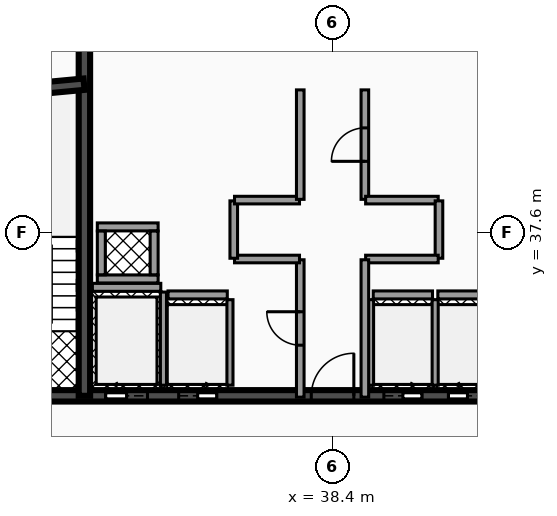
"""IFC4 building model, lengths in metres.
Left out: names, types, materials, properties, quantities, classifications, styles, units other than length and angle.
Written with IfcOpenShell. Run it as: python <this file> out.ifc"""

import sys

from ifc_helpers import new_model, si_unit, direction, frame, frame_2d, origin, place, context, subcontext, project, spatial, rectangle, extrude, element, fill, save


model = new_model("IFC4")
c1 = context("Model", 3, precision=1e-05, world=origin(), true_north=direction((0.0, 1.0)))
c2 = subcontext(c1, "Body", "Model", "MODEL_VIEW")
j1 = project(units=[si_unit("LENGTHUNIT", "METRE"), si_unit("PLANEANGLEUNIT", "RADIAN")], contexts=[c1])
p1 = place(None, origin())
s1 = spatial("IfcSite", under=j1, at=p1, CompositionType="ELEMENT")
p2 = place(p1, origin())
s2 = spatial("IfcBuilding", under=s1, at=p2, CompositionType="ELEMENT")
p3 = place(p2, frame((0.0, 0.0, 218.96)))
s3 = spatial("IfcBuildingStorey", under=s2, at=p3, CompositionType="ELEMENT", Elevation=218.96)
p4 = place(p3, frame((28.5, 33.3, 0.0), z_axis=(0.0, 0.0, 1.0), x_axis=(1.0, 0.0, 0.0)))
e1 = element("IfcWall", 1, at=p4, inside=s3, PredefinedType="SHEAR", context=c2, shape_type="SweptSolid", body=[
    extrude(rectangle(XDim=19.86, YDim=0.3, at=frame_2d((9.93, 0.0))), origin(), (0.0, 0.0, 1.0), 3.18),
])
p5 = place(p4, frame((3.93, 0.0, 0.0)))
e2 = element("IfcOpeningElement", 2, at=p5, cuts=e1, PredefinedType="OPENING", context=c2, shape_type="SweptSolid", body=[
    extrude(rectangle(XDim=1.1, YDim=2.15, at=frame_2d((0.55, 1.075))), frame((0.0, 0.16, 0.0), z_axis=(0.0, -1.0, 0.0), x_axis=(1.0, 0.0, 0.0)), (0.0, 0.0, 1.0), 0.32),
])
p6 = place(p4, frame((14.77, 0.0, 0.0)))
e3 = element("IfcOpeningElement", 3, at=p6, cuts=e1, PredefinedType="OPENING", context=c2, shape_type="SweptSolid", body=[
    extrude(rectangle(XDim=1.1, YDim=2.15, at=frame_2d((0.55, 1.075))), frame((0.0, 0.16, 0.0), z_axis=(0.0, -1.0, 0.0), x_axis=(1.0, 0.0, 0.0)), (0.0, 0.0, 1.0), 0.32),
])
p7 = place(p4, frame((11.25, 0.0, 0.0)))
e4 = element("IfcOpeningElement", 4, at=p7, cuts=e1, PredefinedType="OPENING", context=c2, shape_type="SweptSolid", body=[
    extrude(rectangle(XDim=1.0, YDim=2.1, at=frame_2d((0.5, 1.05))), frame((0.0, 0.16, 0.0), z_axis=(0.0, -1.0, 0.0), x_axis=(1.0, 0.0, 0.0)), (0.0, 0.0, 1.0), 0.32),
])
p8 = place(p4, frame((12.95, 0.0, 0.0)))
e5 = element("IfcOpeningElement", 5, at=p8, cuts=e1, PredefinedType="OPENING", context=c2, shape_type="SweptSolid", body=[
    extrude(rectangle(XDim=1.0, YDim=2.1, at=frame_2d((0.5, 1.05))), frame((0.0, 0.16, 0.0), z_axis=(0.0, -1.0, 0.0), x_axis=(1.0, 0.0, 0.0)), (0.0, 0.0, 1.0), 0.32),
])
p9 = place(p4, frame((5.85, 0.0, 0.0)))
e6 = element("IfcOpeningElement", 6, at=p9, cuts=e1, PredefinedType="OPENING", context=c2, shape_type="SweptSolid", body=[
    extrude(rectangle(XDim=1.0, YDim=2.1, at=frame_2d((0.5, 1.05))), frame((0.0, 0.16, 0.0), z_axis=(0.0, -1.0, 0.0), x_axis=(1.0, 0.0, 0.0)), (0.0, 0.0, 1.0), 0.32),
])
p10 = place(p4, frame((1.21, 0.0, 0.0)))
e7 = element("IfcOpeningElement", 7, at=p10, cuts=e1, PredefinedType="OPENING", context=c2, shape_type="SweptSolid", body=[
    extrude(rectangle(XDim=1.1, YDim=2.2, at=frame_2d((0.55, 1.1))), frame((0.0, 0.16, 0.0), z_axis=(0.0, -1.0, 0.0), x_axis=(1.0, 0.0, 0.0)), (0.0, 0.0, 1.0), 0.32),
])
p11 = place(p4, frame((9.34, 0.0, 0.0)))
e8 = element("IfcOpeningElement", 8, at=p11, cuts=e1, PredefinedType="OPENING", context=c2, shape_type="SweptSolid", body=[
    extrude(rectangle(XDim=1.12, YDim=2.05, at=frame_2d((0.56, 1.025))), frame((0.0, 0.16, 0.0), z_axis=(0.0, -1.0, 0.0), x_axis=(1.0, 0.0, 0.0)), (0.0, 0.0, 1.0), 0.32),
])
p12 = place(p4, frame((17.55, 0.0, 0.0)))
e9 = element("IfcOpeningElement", 9, at=p12, cuts=e1, PredefinedType="OPENING", context=c2, shape_type="SweptSolid", body=[
    extrude(rectangle(XDim=1.1, YDim=2.2, at=frame_2d((0.55, 1.1))), frame((0.0, 0.16, 0.0), z_axis=(0.0, -1.0, 0.0), x_axis=(1.0, 0.0, 0.0)), (0.0, 0.0, 1.0), 0.32),
])
p13 = place(p3, frame((31.87, 33.3, 0.0), z_axis=(0.0, 0.0, 1.0), x_axis=(0.0, 1.0, 0.0)))
e10 = element("IfcWall", 10, at=p13, inside=s3, PredefinedType="SHEAR", context=c2, shape_type="SweptSolid", body=[
    extrude(rectangle(XDim=10.1, YDim=0.3, at=frame_2d((5.05, 0.0))), origin(), (0.0, 0.0, 1.0), 3.18),
])
p14 = place(p3, frame((28.64, 41.2, 0.0), z_axis=(0.0, 0.0, 1.0), x_axis=(0.995687118776, 0.092774789157, 0.0)))
e11 = element("IfcWall", 11, at=p14, inside=s3, PredefinedType="SHEAR", context=c2, shape_type="SweptSolid", body=[
    extrude(rectangle(XDim=3.234, YDim=0.3, at=frame_2d((1.617, 0.0))), origin(), (0.0, 0.0, 1.0), 3.18),
])
p15 = place(p3, frame((32.08, 36.155, 0.0), z_axis=(0.0, 0.0, 1.0), x_axis=(1.0, 0.0, 0.0)))
e12 = element("IfcWall", 12, at=p15, inside=s3, PredefinedType="SOLIDWALL", context=c2, shape_type="SweptSolid", body=[
    extrude(rectangle(XDim=1.8, YDim=0.21, at=frame_2d((0.9, 0.0))), origin(), (0.0, 0.0, 1.0), 3.18),
])
p16 = place(p3, frame((33.95, 33.58, 0.0), z_axis=(0.0, 0.0, 1.0), x_axis=(0.0, 1.0, 0.0)))
e13 = element("IfcWall", 13, at=p16, inside=s3, PredefinedType="SOLIDWALL", context=c2, shape_type="SweptSolid", body=[
    extrude(rectangle(XDim=2.45, YDim=0.16, at=frame_2d((1.225, 0.0))), origin(), (0.0, 0.0, 1.0), 3.18),
])
p17 = place(p3, frame((39.47, 35.955, 0.0), z_axis=(0.0, 0.0, 1.0), x_axis=(1.0, 0.0, 0.0)))
e14 = element("IfcWall", 14, at=p17, inside=s3, PredefinedType="SOLIDWALL", context=c2, shape_type="SweptSolid", body=[
    extrude(rectangle(XDim=1.56, YDim=0.21, at=frame_2d((0.78, 0.0))), origin(), (0.0, 0.0, 1.0), 3.18),
])
for number, where, z_axis, x_axis in (
    (15, (39.4, 33.58, 0.0), (0.0, 0.0, 1.0), (0.0, 1.0, 0.0)),
    (16, (41.1, 33.58, 0.0), (0.0, 0.0, 1.0), (0.0, 1.0, 0.0)),
):
    element("IfcWall", number, at=place(p3, frame(where, z_axis=z_axis, x_axis=x_axis)), inside=s3, PredefinedType="SOLIDWALL", context=c2, shape_type="SweptSolid", body=[
        extrude(rectangle(XDim=2.25, YDim=0.16, at=frame_2d((1.125, 0.0))), origin(), (0.0, 0.0, 1.0), 3.18),
    ])
p18 = place(p3, frame((41.17, 35.955, 0.0), z_axis=(0.0, 0.0, 1.0), x_axis=(1.0, 0.0, 0.0)))
e17 = element("IfcWall", 17, at=p18, inside=s3, PredefinedType="SOLIDWALL", context=c2, shape_type="SweptSolid", body=[
    extrude(rectangle(XDim=1.56, YDim=0.21, at=frame_2d((0.78, 0.0))), origin(), (0.0, 0.0, 1.0), 3.18),
])
p19 = place(p3, frame((34.07, 35.955, 0.0), z_axis=(0.0, 0.0, 1.0), x_axis=(1.0, 0.0, 0.0)))
e18 = element("IfcWall", 18, at=p19, inside=s3, PredefinedType="SOLIDWALL", context=c2, shape_type="SweptSolid", body=[
    extrude(rectangle(XDim=1.56, YDim=0.21, at=frame_2d((0.78, 0.0))), origin(), (0.0, 0.0, 1.0), 3.18),
])
p20 = place(p3, frame((35.7, 33.58, 0.0), z_axis=(0.0, 0.0, 1.0), x_axis=(0.0, 1.0, 0.0)))
e19 = element("IfcWall", 19, at=p20, inside=s3, PredefinedType="SOLIDWALL", context=c2, shape_type="SweptSolid", body=[
    extrude(rectangle(XDim=2.25, YDim=0.16, at=frame_2d((1.125, 0.0))), origin(), (0.0, 0.0, 1.0), 3.18),
])
for number, where, z_axis, x_axis in (
    (20, (32.21, 36.375, 0.0), (0.0, 0.0, 1.0), (1.0, 0.0, 0.0)),
    (21, (32.21, 37.745, 0.0), (0.0, 0.0, 1.0), (1.0, 0.0, 0.0)),
):
    element("IfcWall", number, at=place(p3, frame(where, z_axis=z_axis, x_axis=x_axis)), inside=s3, PredefinedType="SOLIDWALL", context=c2, shape_type="SweptSolid", body=[
        extrude(rectangle(XDim=1.6, YDim=0.21, at=frame_2d((0.8, 0.0))), origin(), (0.0, 0.0, 1.0), 3.18),
    ])
for number, where, z_axis, x_axis in (
    (22, (32.315, 36.485, 0.0), (0.0, 0.0, 1.0), (0.0, 1.0, 0.0)),
    (23, (33.705, 36.485, 0.0), (0.0, 0.0, 1.0), (0.0, 1.0, 0.0)),
):
    element("IfcWall", number, at=place(p3, frame(where, z_axis=z_axis, x_axis=x_axis)), inside=s3, PredefinedType="SOLIDWALL", context=c2, shape_type="SweptSolid", body=[
        extrude(rectangle(XDim=1.15, YDim=0.21, at=frame_2d((0.575, 0.0))), origin(), (0.0, 0.0, 1.0), 3.18),
    ])
p21 = place(p3, frame((37.55, 33.265, 0.0), z_axis=(0.0, 0.0, 1.0), x_axis=(0.0, 1.0, 0.0)))
e24 = element("IfcWall", 24, at=p21, inside=s3, PredefinedType="PARTITIONING", context=c2, shape_type="SweptSolid", body=[
    extrude(rectangle(XDim=3.615, YDim=0.2, at=frame_2d((1.808, 0.0))), origin(), (0.0, 0.0, 1.0), 2.235),
])
p22 = place(p21, frame((1.367, 0.0, 0.0)))
e25 = element("IfcOpeningElement", 25, at=p22, cuts=e24, PredefinedType="OPENING", context=c2, shape_type="SweptSolid", body=[
    extrude(rectangle(XDim=0.88, YDim=2.05, at=frame_2d((0.44, 1.025))), frame((0.0, 0.11, 0.0), z_axis=(0.0, -1.0, 0.0), x_axis=(1.0, 0.0, 0.0)), (0.0, 0.0, 1.0), 0.22),
])
p23 = place(p3, frame((35.82, 36.9, 0.0), z_axis=(0.0, 0.0, 1.0), x_axis=(1.0, 0.0, 0.0)))
e26 = element("IfcWall", 26, at=p23, inside=s3, PredefinedType="PARTITIONING", context=c2, shape_type="SweptSolid", body=[
    extrude(rectangle(XDim=1.71, YDim=0.2, at=frame_2d((0.855, 0.0))), origin(), (0.0, 0.0, 1.0), 2.235),
])
p24 = place(p3, frame((35.8, 36.92, 0.0), z_axis=(0.0, 0.0, 1.0), x_axis=(0.0, 1.0, 0.0)))
e27 = element("IfcWall", 27, at=p24, inside=s3, PredefinedType="PARTITIONING", context=c2, shape_type="SweptSolid", body=[
    extrude(rectangle(XDim=1.51, YDim=0.2, at=frame_2d((0.755, 0.0))), origin(), (0.0, 0.0, 1.0), 2.235),
])
p25 = place(p3, frame((35.82, 38.45, 0.0), z_axis=(0.0, 0.0, 1.0), x_axis=(1.0, 0.0, 0.0)))
e28 = element("IfcWall", 28, at=p25, inside=s3, PredefinedType="PARTITIONING", context=c2, shape_type="SweptSolid", body=[
    extrude(rectangle(XDim=1.71, YDim=0.2, at=frame_2d((0.855, 0.0))), origin(), (0.0, 0.0, 1.0), 2.235),
])
p26 = place(p3, frame((37.55, 38.47, 0.0), z_axis=(0.0, 0.0, 1.0), x_axis=(0.0, 1.0, 0.0)))
e29 = element("IfcWall", 29, at=p26, inside=s3, PredefinedType="PARTITIONING", context=c2, shape_type="SweptSolid", body=[
    extrude(rectangle(XDim=2.88, YDim=0.2, at=frame_2d((1.44, 0.0))), origin(), (0.0, 0.0, 1.0), 2.235),
])
p27 = place(p3, frame((39.25, 38.47, 0.0), z_axis=(0.0, 0.0, 1.0), x_axis=(0.0, 1.0, 0.0)))
e30 = element("IfcWall", 30, at=p27, inside=s3, PredefinedType="PARTITIONING", context=c2, shape_type="SweptSolid", body=[
    extrude(rectangle(XDim=2.88, YDim=0.2, at=frame_2d((1.44, 0.0))), origin(), (0.0, 0.0, 1.0), 2.235),
])
p28 = place(p27, frame((1.0, 0.0, 0.0)))
e31 = element("IfcOpeningElement", 31, at=p28, cuts=e30, PredefinedType="OPENING", context=c2, shape_type="SweptSolid", body=[
    extrude(rectangle(XDim=0.88, YDim=2.05, at=frame_2d((0.44, 1.025))), frame((0.0, 0.11, 0.0), z_axis=(0.0, -1.0, 0.0), x_axis=(1.0, 0.0, 0.0)), (0.0, 0.0, 1.0), 0.22),
])
p29 = place(p3, frame((39.27, 38.45, 0.0), z_axis=(0.0, 0.0, 1.0), x_axis=(1.0, 0.0, 0.0)))
e32 = element("IfcWall", 32, at=p29, inside=s3, PredefinedType="PARTITIONING", context=c2, shape_type="SweptSolid", body=[
    extrude(rectangle(XDim=1.91, YDim=0.2, at=frame_2d((0.955, 0.0))), origin(), (0.0, 0.0, 1.0), 2.235),
])
p30 = place(p3, frame((41.2, 36.92, 0.0), z_axis=(0.0, 0.0, 1.0), x_axis=(0.0, 1.0, 0.0)))
e33 = element("IfcWall", 33, at=p30, inside=s3, PredefinedType="PARTITIONING", context=c2, shape_type="SweptSolid", body=[
    extrude(rectangle(XDim=1.51, YDim=0.2, at=frame_2d((0.755, 0.0))), origin(), (0.0, 0.0, 1.0), 2.235),
])
p31 = place(p3, frame((39.27, 36.9, 0.0), z_axis=(0.0, 0.0, 1.0), x_axis=(1.0, 0.0, 0.0)))
e34 = element("IfcWall", 34, at=p31, inside=s3, PredefinedType="PARTITIONING", context=c2, shape_type="SweptSolid", body=[
    extrude(rectangle(XDim=1.91, YDim=0.2, at=frame_2d((0.955, 0.0))), origin(), (0.0, 0.0, 1.0), 2.235),
])
p32 = place(p3, frame((39.25, 33.265, 0.0), z_axis=(0.0, 0.0, 1.0), x_axis=(0.0, 1.0, 0.0)))
e35 = element("IfcWall", 35, at=p32, inside=s3, PredefinedType="PARTITIONING", context=c2, shape_type="SweptSolid", body=[
    extrude(rectangle(XDim=3.615, YDim=0.2, at=frame_2d((1.808, 0.0))), origin(), (0.0, 0.0, 1.0), 2.235),
])
p33 = place(p5, origin())
e36 = element("IfcDoor", 36, at=p33, inside=s3, OperationType="SLIDING_TO_LEFT", PredefinedType="DOOR", context=c2, shape_type="SweptSolid", body=[
    extrude(rectangle(XDim=1.1, YDim=2.15, at=frame_2d((0.55, 1.075))), frame((0.0, 0.025, 0.0), z_axis=(0.0, -1.0, 0.0), x_axis=(1.0, 0.0, 0.0)), (0.0, 0.0, 1.0), 0.05),
])
fill(e2, e36)
p34 = place(p7, origin())
e37 = element("IfcDoor", 37, at=p34, inside=s3, OperationType="SLIDING_TO_RIGHT", PredefinedType="DOOR", context=c2, shape_type="SweptSolid", body=[
    extrude(rectangle(XDim=1.0, YDim=2.1, at=frame_2d((0.5, 1.05))), frame((0.0, 0.025, 0.0), z_axis=(0.0, -1.0, 0.0), x_axis=(1.0, 0.0, 0.0)), (0.0, 0.0, 1.0), 0.05),
])
fill(e4, e37)
p35 = place(p8, origin())
e38 = element("IfcDoor", 38, at=p35, inside=s3, OperationType="SLIDING_TO_LEFT", PredefinedType="DOOR", context=c2, shape_type="SweptSolid", body=[
    extrude(rectangle(XDim=1.0, YDim=2.1, at=frame_2d((0.5, 1.05))), frame((0.0, 0.025, 0.0), z_axis=(0.0, -1.0, 0.0), x_axis=(1.0, 0.0, 0.0)), (0.0, 0.0, 1.0), 0.05),
])
fill(e5, e38)
p36 = place(p9, origin())
e39 = element("IfcDoor", 39, at=p36, inside=s3, OperationType="SLIDING_TO_RIGHT", PredefinedType="DOOR", context=c2, shape_type="SweptSolid", body=[
    extrude(rectangle(XDim=1.0, YDim=2.1, at=frame_2d((0.5, 1.05))), frame((0.0, 0.025, 0.0), z_axis=(0.0, -1.0, 0.0), x_axis=(1.0, 0.0, 0.0)), (0.0, 0.0, 1.0), 0.05),
])
fill(e6, e39)
p37 = place(p11, origin())
e40 = element("IfcDoor", 40, at=p37, inside=s3, OperationType="SINGLE_SWING_RIGHT", PredefinedType="DOOR", context=c2, shape_type="SweptSolid", body=[
    extrude(rectangle(XDim=1.12, YDim=2.05, at=frame_2d((0.56, 1.025))), frame((0.0, 0.025, 0.0), z_axis=(0.0, -1.0, 0.0), x_axis=(1.0, 0.0, 0.0)), (0.0, 0.0, 1.0), 0.05),
])
fill(e8, e40)
p38 = place(p22, origin())
e41 = element("IfcDoor", 41, at=p38, inside=s3, OperationType="SINGLE_SWING_RIGHT", PredefinedType="DOOR", context=c2, shape_type="SweptSolid", body=[
    extrude(rectangle(XDim=0.88, YDim=2.05, at=frame_2d((0.44, 1.025))), frame((0.0, 0.025, 0.0), z_axis=(0.0, -1.0, 0.0), x_axis=(1.0, 0.0, 0.0)), (0.0, 0.0, 1.0), 0.05),
])
fill(e25, e41)
p39 = place(p28, origin())
e42 = element("IfcDoor", 42, at=p39, inside=s3, OperationType="SINGLE_SWING_LEFT", PredefinedType="DOOR", context=c2, shape_type="SweptSolid", body=[
    extrude(rectangle(XDim=0.88, YDim=2.05, at=frame_2d((0.44, 1.025))), frame((0.0, 0.025, 0.0), z_axis=(0.0, -1.0, 0.0), x_axis=(1.0, 0.0, 0.0)), (0.0, 0.0, 1.0), 0.05),
])
fill(e31, e42)
save(model, sys.argv[1])
